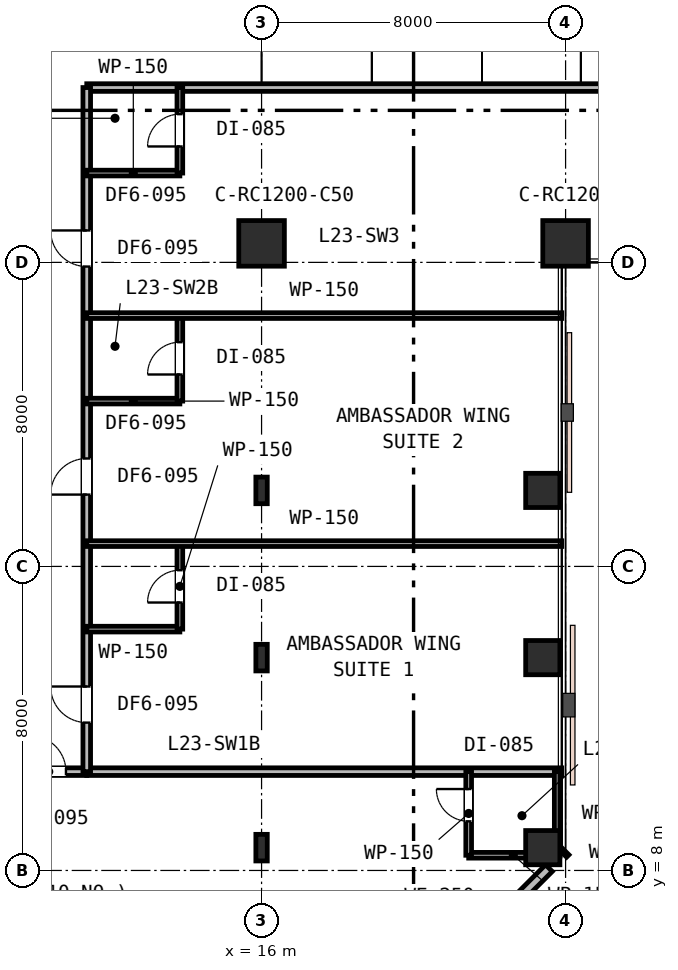
"""IFC4 building model, lengths in metres.
Left out: names, types, materials, properties, quantities, classifications, styles, units other than length and angle.
Written with IfcOpenShell. Run it as: python <this file> out.ifc"""

import sys

from ifc_helpers import new_model, si_unit, direction, frame, frame_2d, origin, origin_2d, place, context, subcontext, project, spatial, rectangle, i_section, extrude, element, fill, save


model = new_model("IFC4")
c1 = context("Model", 3, precision=1e-05, world=origin(), true_north=direction((0.0, 1.0)))
c2 = subcontext(c1, "Body", "Model", "MODEL_VIEW")
j1 = project(units=[si_unit("LENGTHUNIT", "METRE"), si_unit("PLANEANGLEUNIT", "RADIAN")], contexts=[c1])
p1 = place(None, origin())
s1 = spatial("IfcSite", under=j1, at=p1, CompositionType="ELEMENT")
p2 = place(p1, origin())
s2 = spatial("IfcBuilding", under=s1, at=p2, CompositionType="ELEMENT")
p3 = place(p2, frame((0.0, 0.0, 93.6)))
s3 = spatial("IfcBuildingStorey", under=s2, at=p3, CompositionType="ELEMENT", Elevation=93.6)
for number, where, z_axis, x_axis in (
    (1, (16.0, 24.5, 0.0), (0.0, 0.0, 1.0), (1.0, 0.0, 0.0)),
    (2, (24.0, 24.5, 0.0), (0.0, 0.0, 1.0), (1.0, 0.0, 0.0)),
):
    element("IfcColumn", number, at=place(p3, frame(where, z_axis=z_axis, x_axis=x_axis)), inside=s3, PredefinedType="COLUMN", context=c2, shape_type="SweptSolid", body=[
        extrude(rectangle(XDim=1.2, YDim=1.2, at=origin_2d()), origin(), (0.0, 0.0, 1.0), 3.6),
    ])
for number, where, z_axis, x_axis in (
    (3, (23.4, 8.6, 0.0), (0.0, 0.0, 1.0), (1.0, 0.0, 0.0)),
    (4, (23.4, 13.6, 0.0), (0.0, 0.0, 1.0), (1.0, 0.0, 0.0)),
    (5, (23.4, 18.0, 0.0), (0.0, 0.0, 1.0), (1.0, 0.0, 0.0)),
):
    element("IfcColumn", number, at=place(p3, frame(where, z_axis=z_axis, x_axis=x_axis)), inside=s3, PredefinedType="COLUMN", context=c2, shape_type="SweptSolid", body=[
        extrude(rectangle(XDim=0.9, YDim=0.9, at=origin_2d()), origin(), (0.0, 0.0, 1.0), 3.6),
    ])
for number, where, z_axis, x_axis in (
    (6, (16.0, 8.6, 0.0), (0.0, 0.0, 1.0), (1.0, 0.0, 0.0)),
    (7, (16.0, 13.6, 0.0), (0.0, 0.0, 1.0), (1.0, 0.0, 0.0)),
    (8, (16.0, 18.0, 0.0), (0.0, 0.0, 1.0), (1.0, 0.0, 0.0)),
):
    element("IfcColumn", number, at=place(p3, frame(where, z_axis=z_axis, x_axis=x_axis)), inside=s3, PredefinedType="COLUMN", context=c2, shape_type="SweptSolid", body=[
        extrude(i_section(OverallWidth=0.3, OverallDepth=0.7, WebThickness=0.017, FlangeThickness=0.032, FilletRadius=0.027, at=origin_2d()), origin(), (0.0, 0.0, 1.0), 3.6),
    ])
p4 = place(p3, frame((20.5, 5.0, 0.0), z_axis=(0.0, 0.0, 1.0), x_axis=(0.707106781187, 0.707106781187, 0.0)))
e9 = element("IfcWall", 9, at=p4, inside=s3, PredefinedType="STANDARD", context=c2, shape_type="SweptSolid", body=[
    extrude(rectangle(XDim=4.33, YDim=0.25, at=frame_2d((2.165, 0.0))), origin(), (0.0, 0.0, 1.0), 3.33),
])
p5 = place(p4, frame((1.265, 0.0, 0.75)))
e10 = element("IfcOpeningElement", 10, at=p5, cuts=e9, PredefinedType="OPENING", context=c2, shape_type="SweptSolid", body=[
    extrude(rectangle(XDim=1.8, YDim=1.85, at=frame_2d((0.9, 0.925))), frame((0.0, 0.135, 0.0), z_axis=(0.0, -1.0, 0.0), x_axis=(1.0, 0.0, 0.0)), (0.0, 0.0, 1.0), 0.27),
])
p6 = place(p3, frame((23.938, 8.438, 0.0), z_axis=(0.0, 0.0, 1.0), x_axis=(0.707106781187, 0.707106781187, 0.0)))
e11 = element("IfcWall", 11, at=p6, inside=s3, PredefinedType="STANDARD", context=c2, shape_type="SweptSolid", body=[
    extrude(rectangle(XDim=0.087, YDim=0.25, at=frame_2d((0.044, 0.0))), origin(), (0.0, 0.0, 1.0), 3.33),
])
p7 = place(p3, frame((11.4, 28.6, 0.0), z_axis=(0.0, 0.0, 1.0), x_axis=(1.0, 0.0, 0.0)))
e12 = element("IfcWall", 12, at=p7, inside=s3, PredefinedType="PARTITIONING", context=c2, shape_type="SweptSolid", body=[
    extrude(rectangle(XDim=32.8, YDim=0.2, at=frame_2d((16.4, 0.0))), origin(), (0.0, 0.0, 1.0), 2.83),
])
p8 = place(p7, frame((14.7, 0.0, 0.0)))
e13 = element("IfcOpeningElement", 13, at=p8, cuts=e12, PredefinedType="OPENING", context=c2, shape_type="SweptSolid", body=[
    extrude(rectangle(XDim=0.95, YDim=2.15, at=frame_2d((0.475, 1.075))), frame((0.0, 0.11, 0.0), z_axis=(0.0, -1.0, 0.0), x_axis=(1.0, 0.0, 0.0)), (0.0, 0.0, 1.0), 0.22),
])
p9 = place(p7, frame((22.475, 0.0, 0.0)))
e14 = element("IfcOpeningElement", 14, at=p9, cuts=e12, PredefinedType="OPENING", context=c2, shape_type="SweptSolid", body=[
    extrude(rectangle(XDim=0.95, YDim=2.15, at=frame_2d((0.475, 1.075))), frame((0.0, 0.11, 0.0), z_axis=(0.0, -1.0, 0.0), x_axis=(1.0, 0.0, 0.0)), (0.0, 0.0, 1.0), 0.22),
])
p10 = place(p7, frame((28.985, 0.0, 0.0)))
e15 = element("IfcOpeningElement", 15, at=p10, cuts=e12, PredefinedType="OPENING", context=c2, shape_type="SweptSolid", body=[
    extrude(rectangle(XDim=0.95, YDim=2.15, at=frame_2d((0.475, 1.075))), frame((0.0, 0.11, 0.0), z_axis=(0.0, -1.0, 0.0), x_axis=(1.0, 0.0, 0.0)), (0.0, 0.0, 1.0), 0.22),
])
p11 = place(p3, frame((11.4, 10.6, 0.0), z_axis=(0.0, 0.0, 1.0), x_axis=(1.0, 0.0, 0.0)))
e16 = element("IfcWall", 16, at=p11, inside=s3, PredefinedType="PARTITIONING", context=c2, shape_type="SweptSolid", body=[
    extrude(rectangle(XDim=12.5, YDim=0.2, at=frame_2d((6.25, 0.0))), origin(), (0.0, 0.0, 1.0), 2.83),
])
p12 = place(p3, frame((9.4, 10.6, 0.0), z_axis=(0.0, 0.0, 1.0), x_axis=(1.0, 0.0, 0.0)))
e17 = element("IfcWall", 17, at=p12, inside=s3, PredefinedType="PARTITIONING", context=c2, shape_type="SweptSolid", body=[
    extrude(rectangle(XDim=2.0, YDim=0.2, at=frame_2d((1.0, 0.0))), origin(), (0.0, 0.0, 1.0), 3.02),
])
p13 = place(p12, frame((0.502, 0.0, 0.0)))
e18 = element("IfcOpeningElement", 18, at=p13, cuts=e17, PredefinedType="OPENING", context=c2, shape_type="SweptSolid", body=[
    extrude(rectangle(XDim=0.95, YDim=2.15, at=frame_2d((0.475, 1.075))), frame((0.0, 0.11, 0.0), z_axis=(0.0, -1.0, 0.0), x_axis=(1.0, 0.0, 0.0)), (0.0, 0.0, 1.0), 0.22),
])
p14 = place(p3, frame((21.45, 8.4, 0.0), z_axis=(0.0, 0.0, 1.0), x_axis=(1.0, 0.0, 0.0)))
e19 = element("IfcWall", 19, at=p14, inside=s3, PredefinedType="PARTITIONING", context=c2, shape_type="SweptSolid", body=[
    extrude(rectangle(XDim=2.35, YDim=0.15, at=frame_2d((1.175, 0.0))), origin(), (0.0, 0.0, 1.0), 2.83),
])
p15 = place(p3, frame((21.45, 8.4, 0.0), z_axis=(0.0, 0.0, 1.0), x_axis=(0.0, 1.0, 0.0)))
e20 = element("IfcWall", 20, at=p15, inside=s3, PredefinedType="PARTITIONING", context=c2, shape_type="SweptSolid", body=[
    extrude(rectangle(XDim=2.2, YDim=0.15, at=frame_2d((1.1, 0.0))), origin(), (0.0, 0.0, 1.0), 2.83),
])
p16 = place(p15, frame((0.892, 0.0, 0.0)))
e21 = element("IfcOpeningElement", 21, at=p16, cuts=e20, PredefinedType="OPENING", context=c2, shape_type="SweptSolid", body=[
    extrude(rectangle(XDim=0.85, YDim=2.15, at=frame_2d((0.425, 1.075))), frame((0.0, 0.085, 0.0), z_axis=(0.0, -1.0, 0.0), x_axis=(1.0, 0.0, 0.0)), (0.0, 0.0, 1.0), 0.17),
])
p17 = place(p3, frame((23.78, 10.6, 0.0), z_axis=(0.0, 0.0, 1.0), x_axis=(0.0, -1.0, 0.0)))
e22 = element("IfcWall", 22, at=p17, inside=s3, PredefinedType="PARTITIONING", context=c2, shape_type="SweptSolid", body=[
    extrude(rectangle(XDim=2.22, YDim=0.15, at=frame_2d((1.11, 0.0))), origin(), (0.0, 0.0, 1.0), 2.83),
])
p18 = place(p3, frame((11.4, 10.6, 0.0), z_axis=(0.0, 0.0, 1.0), x_axis=(0.0, 1.0, 0.0)))
e23 = element("IfcWall", 23, at=p18, inside=s3, PredefinedType="PARTITIONING", context=c2, shape_type="SweptSolid", body=[
    extrude(rectangle(XDim=18.0, YDim=0.2, at=frame_2d((9.0, 0.0))), origin(), (0.0, 0.0, 1.0), 2.83),
])
p19 = place(p18, frame((1.29, 0.0, 0.0)))
e24 = element("IfcOpeningElement", 24, at=p19, cuts=e23, PredefinedType="OPENING", context=c2, shape_type="SweptSolid", body=[
    extrude(rectangle(XDim=0.95, YDim=2.15, at=frame_2d((0.475, 1.075))), frame((0.0, 0.11, 0.0), z_axis=(0.0, -1.0, 0.0), x_axis=(1.0, 0.0, 0.0)), (0.0, 0.0, 1.0), 0.22),
])
p20 = place(p18, frame((7.29, 0.0, 0.0)))
e25 = element("IfcOpeningElement", 25, at=p20, cuts=e23, PredefinedType="OPENING", context=c2, shape_type="SweptSolid", body=[
    extrude(rectangle(XDim=0.95, YDim=2.15, at=frame_2d((0.475, 1.075))), frame((0.0, 0.11, 0.0), z_axis=(0.0, -1.0, 0.0), x_axis=(1.0, 0.0, 0.0)), (0.0, 0.0, 1.0), 0.22),
])
p21 = place(p18, frame((13.29, 0.0, 0.0)))
e26 = element("IfcOpeningElement", 26, at=p21, cuts=e23, PredefinedType="OPENING", context=c2, shape_type="SweptSolid", body=[
    extrude(rectangle(XDim=0.95, YDim=2.15, at=frame_2d((0.475, 1.075))), frame((0.0, 0.11, 0.0), z_axis=(0.0, -1.0, 0.0), x_axis=(1.0, 0.0, 0.0)), (0.0, 0.0, 1.0), 0.22),
])
p22 = place(p3, frame((11.4, 14.35, 0.0), z_axis=(0.0, 0.0, 1.0), x_axis=(1.0, 0.0, 0.0)))
e27 = element("IfcWall", 27, at=p22, inside=s3, PredefinedType="PARTITIONING", context=c2, shape_type="SweptSolid", body=[
    extrude(rectangle(XDim=2.45, YDim=0.15, at=frame_2d((1.225, 0.0))), origin(), (0.0, 0.0, 1.0), 3.02),
])
p23 = place(p3, frame((13.85, 14.35, 0.0), z_axis=(0.0, 0.0, 1.0), x_axis=(0.0, 1.0, 0.0)))
e28 = element("IfcWall", 28, at=p23, inside=s3, PredefinedType="PARTITIONING", context=c2, shape_type="SweptSolid", body=[
    extrude(rectangle(XDim=2.25, YDim=0.15, at=frame_2d((1.125, 0.0))), origin(), (0.0, 0.0, 1.0), 3.02),
])
p24 = place(p23, frame((0.7, 0.0, 0.0)))
e29 = element("IfcOpeningElement", 29, at=p24, cuts=e28, PredefinedType="OPENING", context=c2, shape_type="SweptSolid", body=[
    extrude(rectangle(XDim=0.85, YDim=2.15, at=frame_2d((0.425, 1.075))), frame((0.0, 0.085, 0.0), z_axis=(0.0, -1.0, 0.0), x_axis=(1.0, 0.0, 0.0)), (0.0, 0.0, 1.0), 0.17),
])
p25 = place(p3, frame((11.4, 16.6, 0.0), z_axis=(0.0, 0.0, 1.0), x_axis=(1.0, 0.0, 0.0)))
e30 = element("IfcWall", 30, at=p25, inside=s3, PredefinedType="PARTITIONING", context=c2, shape_type="SweptSolid", body=[
    extrude(rectangle(XDim=12.5, YDim=0.15, at=frame_2d((6.25, 0.0))), origin(), (0.0, 0.0, 1.0), 2.83),
])
p26 = place(p3, frame((11.4, 20.35, 0.0), z_axis=(0.0, 0.0, 1.0), x_axis=(1.0, 0.0, 0.0)))
e31 = element("IfcWall", 31, at=p26, inside=s3, PredefinedType="PARTITIONING", context=c2, shape_type="SweptSolid", body=[
    extrude(rectangle(XDim=2.45, YDim=0.15, at=frame_2d((1.225, 0.0))), origin(), (0.0, 0.0, 1.0), 3.33),
])
p27 = place(p3, frame((13.85, 20.35, 0.0), z_axis=(0.0, 0.0, 1.0), x_axis=(0.0, 1.0, 0.0)))
e32 = element("IfcWall", 32, at=p27, inside=s3, PredefinedType="PARTITIONING", context=c2, shape_type="SweptSolid", body=[
    extrude(rectangle(XDim=2.25, YDim=0.15, at=frame_2d((1.125, 0.0))), origin(), (0.0, 0.0, 1.0), 3.33),
])
p28 = place(p27, frame((0.7, 0.0, 0.0)))
e33 = element("IfcOpeningElement", 33, at=p28, cuts=e32, PredefinedType="OPENING", context=c2, shape_type="SweptSolid", body=[
    extrude(rectangle(XDim=0.85, YDim=2.15, at=frame_2d((0.425, 1.075))), frame((0.0, 0.085, 0.0), z_axis=(0.0, -1.0, 0.0), x_axis=(1.0, 0.0, 0.0)), (0.0, 0.0, 1.0), 0.17),
])
p29 = place(p3, frame((11.4, 22.6, 0.0), z_axis=(0.0, 0.0, 1.0), x_axis=(1.0, 0.0, 0.0)))
e34 = element("IfcWall", 34, at=p29, inside=s3, PredefinedType="PARTITIONING", context=c2, shape_type="SweptSolid", body=[
    extrude(rectangle(XDim=12.5, YDim=0.15, at=frame_2d((6.25, 0.0))), origin(), (0.0, 0.0, 1.0), 2.83),
])
p30 = place(p3, frame((11.4, 26.35, 0.0), z_axis=(0.0, 0.0, 1.0), x_axis=(1.0, 0.0, 0.0)))
e35 = element("IfcWall", 35, at=p30, inside=s3, PredefinedType="PARTITIONING", context=c2, shape_type="SweptSolid", body=[
    extrude(rectangle(XDim=2.45, YDim=0.15, at=frame_2d((1.225, 0.0))), origin(), (0.0, 0.0, 1.0), 3.33),
])
p31 = place(p3, frame((13.85, 26.35, 0.0), z_axis=(0.0, 0.0, 1.0), x_axis=(0.0, 1.0, 0.0)))
e36 = element("IfcWall", 36, at=p31, inside=s3, PredefinedType="PARTITIONING", context=c2, shape_type="SweptSolid", body=[
    extrude(rectangle(XDim=2.25, YDim=0.15, at=frame_2d((1.125, 0.0))), origin(), (0.0, 0.0, 1.0), 3.33),
])
p32 = place(p31, frame((0.7, 0.0, 0.0)))
e37 = element("IfcOpeningElement", 37, at=p32, cuts=e36, PredefinedType="OPENING", context=c2, shape_type="SweptSolid", body=[
    extrude(rectangle(XDim=0.85, YDim=2.15, at=frame_2d((0.425, 1.075))), frame((0.0, 0.085, 0.0), z_axis=(0.0, -1.0, 0.0), x_axis=(1.0, 0.0, 0.0)), (0.0, 0.0, 1.0), 0.17),
])
p33 = place(p13, origin())
e38 = element("IfcDoor", 38, at=p33, inside=s3, OperationType="SINGLE_SWING_LEFT", PredefinedType="DOOR", context=c2, shape_type="SweptSolid", body=[
    extrude(rectangle(XDim=0.95, YDim=2.15, at=frame_2d((0.475, 1.075))), frame((0.0, 0.025, 0.0), z_axis=(0.0, -1.0, 0.0), x_axis=(1.0, 0.0, 0.0)), (0.0, 0.0, 1.0), 0.05),
])
fill(e18, e38)
p34 = place(p16, origin())
e39 = element("IfcDoor", 39, at=p34, inside=s3, OperationType="SINGLE_SWING_RIGHT", PredefinedType="DOOR", context=c2, shape_type="SweptSolid", body=[
    extrude(rectangle(XDim=0.85, YDim=2.15, at=frame_2d((0.425, 1.075))), frame((0.0, 0.025, 0.0), z_axis=(0.0, -1.0, 0.0), x_axis=(1.0, 0.0, 0.0)), (0.0, 0.0, 1.0), 0.05),
])
fill(e21, e39)
p35 = place(p19, origin())
e40 = element("IfcDoor", 40, at=p35, inside=s3, OperationType="SINGLE_SWING_RIGHT", PredefinedType="DOOR", context=c2, shape_type="SweptSolid", body=[
    extrude(rectangle(XDim=0.95, YDim=2.15, at=frame_2d((0.475, 1.075))), frame((0.0, 0.025, 0.0), z_axis=(0.0, -1.0, 0.0), x_axis=(1.0, 0.0, 0.0)), (0.0, 0.0, 1.0), 0.05),
])
fill(e24, e40)
p36 = place(p24, origin())
e41 = element("IfcDoor", 41, at=p36, inside=s3, OperationType="SINGLE_SWING_LEFT", PredefinedType="DOOR", context=c2, shape_type="SweptSolid", body=[
    extrude(rectangle(XDim=0.85, YDim=2.15, at=frame_2d((0.425, 1.075))), frame((0.0, 0.025, 0.0), z_axis=(0.0, -1.0, 0.0), x_axis=(1.0, 0.0, 0.0)), (0.0, 0.0, 1.0), 0.05),
])
fill(e29, e41)
p37 = place(p20, origin())
e42 = element("IfcDoor", 42, at=p37, inside=s3, OperationType="SINGLE_SWING_LEFT", PredefinedType="DOOR", context=c2, shape_type="SweptSolid", body=[
    extrude(rectangle(XDim=0.95, YDim=2.15, at=frame_2d((0.475, 1.075))), frame((0.0, 0.025, 0.0), z_axis=(0.0, -1.0, 0.0), x_axis=(1.0, 0.0, 0.0)), (0.0, 0.0, 1.0), 0.05),
])
fill(e25, e42)
p38 = place(p28, origin())
e43 = element("IfcDoor", 43, at=p38, inside=s3, OperationType="SINGLE_SWING_LEFT", PredefinedType="DOOR", context=c2, shape_type="SweptSolid", body=[
    extrude(rectangle(XDim=0.85, YDim=2.15, at=frame_2d((0.425, 1.075))), frame((0.0, 0.025, 0.0), z_axis=(0.0, -1.0, 0.0), x_axis=(1.0, 0.0, 0.0)), (0.0, 0.0, 1.0), 0.05),
])
fill(e33, e43)
p39 = place(p21, origin())
e44 = element("IfcDoor", 44, at=p39, inside=s3, OperationType="SINGLE_SWING_RIGHT", PredefinedType="DOOR", context=c2, shape_type="SweptSolid", body=[
    extrude(rectangle(XDim=0.95, YDim=2.15, at=frame_2d((0.475, 1.075))), frame((0.0, 0.025, 0.0), z_axis=(0.0, -1.0, 0.0), x_axis=(1.0, 0.0, 0.0)), (0.0, 0.0, 1.0), 0.05),
])
fill(e26, e44)
p40 = place(p32, origin())
e45 = element("IfcDoor", 45, at=p40, inside=s3, OperationType="SINGLE_SWING_LEFT", PredefinedType="DOOR", context=c2, shape_type="SweptSolid", body=[
    extrude(rectangle(XDim=0.85, YDim=2.15, at=frame_2d((0.425, 1.075))), frame((0.0, 0.025, 0.0), z_axis=(0.0, -1.0, 0.0), x_axis=(1.0, 0.0, 0.0)), (0.0, 0.0, 1.0), 0.05),
])
fill(e37, e45)
save(model, sys.argv[1])
